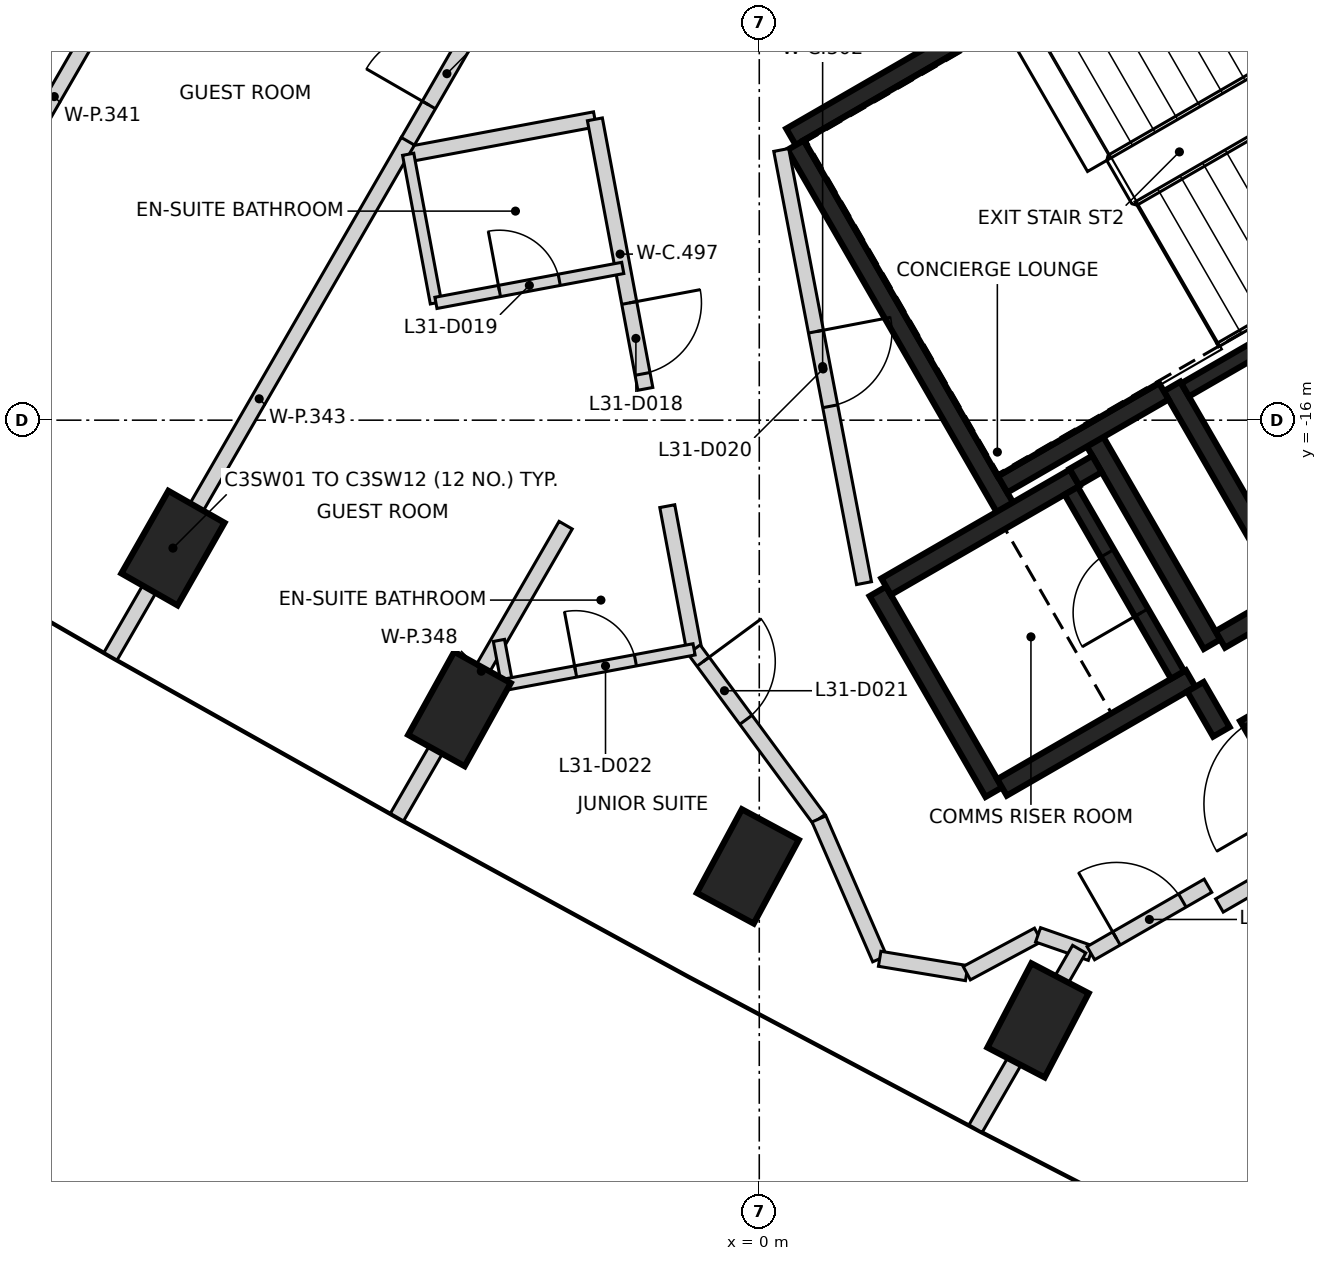
"""IFC4 building model, lengths in metres.
Left out: names, types, materials, properties, quantities, classifications, styles, units other than length and angle.
Written with IfcOpenShell. Run it as: python <this file> out.ifc"""

import sys

from ifc_helpers import new_model, si_unit, direction, frame, frame_2d, origin, origin_2d, place, context, subcontext, project, spatial, rectangle, extrude, element, fill, save


model = new_model("IFC4")
c1 = context("Model", 3, precision=1e-05, world=origin(), true_north=direction((0.0, 1.0)))
c2 = subcontext(c1, "Body", "Model", "MODEL_VIEW")
j1 = project(units=[si_unit("LENGTHUNIT", "METRE"), si_unit("PLANEANGLEUNIT", "RADIAN")], contexts=[c1])
p1 = place(None, origin())
s1 = spatial("IfcSite", under=j1, at=p1, CompositionType="ELEMENT")
p2 = place(p1, origin())
s2 = spatial("IfcBuilding", under=s1, at=p2, CompositionType="ELEMENT")
p3 = place(p2, frame((0.0, 0.0, 128.8)))
s3 = spatial("IfcBuildingStorey", under=s2, at=p3, CompositionType="ELEMENT", Elevation=128.8)
for number, where, z_axis, x_axis in (
    (1, (-7.714, -17.683, -0.4), (0.0, 0.0, 1.0), (0.495, 0.869, 0.0)),
    (2, (-3.945, -19.8, -0.4), (0.0, 0.0, 1.0), (0.485, 0.875, 0.0)),
    (3, (-0.151, -21.871, -0.4), (0.0, 0.0, 1.0), (0.474, 0.881, 0.0)),
    (4, (3.667, -23.896, -0.4), (0.0, 0.0, 1.0), (0.463, 0.886, 0.0)),
):
    element("IfcColumn", number, at=place(p3, frame(where, z_axis=z_axis, x_axis=x_axis)), inside=s3, PredefinedType="COLUMN", context=c2, shape_type="SweptSolid", body=[
        extrude(rectangle(XDim=1.25, YDim=0.85, at=origin_2d()), origin(), (0.0, 0.0, 1.0), 3.6),
    ])
p4 = place(p3, frame((0.417, -12.273, 0.0), z_axis=(0.0, 0.0, 1.0), x_axis=(0.866021906294, 0.500006057782, 0.0)))
e5 = element("IfcWall", 5, at=p4, inside=s3, PredefinedType="SHEAR", context=c2, shape_type="SweptSolid", body=[
    extrude(rectangle(XDim=11.55, YDim=0.25, at=frame_2d((5.775, 0.0))), origin(), (0.0, 0.0, 1.0), 3.2),
])
p5 = place(p4, frame((10.025, 0.0, 0.0)))
e6 = element("IfcOpeningElement", 6, at=p5, cuts=e5, PredefinedType="OPENING", context=c2, shape_type="SweptSolid", body=[
    extrude(rectangle(XDim=1.2, YDim=2.1, at=frame_2d((0.6, 1.05))), frame((0.0, 0.135, 0.0), z_axis=(0.0, -1.0, 0.0), x_axis=(1.0, 0.0, 0.0)), (0.0, 0.0, 1.0), 0.27),
])
p6 = place(p4, frame((8.725, 0.0, 0.0)))
e7 = element("IfcOpeningElement", 7, at=p6, cuts=e5, PredefinedType="OPENING", context=c2, shape_type="SweptSolid", body=[
    extrude(rectangle(XDim=1.2, YDim=2.1, at=frame_2d((0.6, 1.05))), frame((0.0, 0.135, 0.0), z_axis=(0.0, -1.0, 0.0), x_axis=(1.0, 0.0, 0.0)), (0.0, 0.0, 1.0), 0.27),
])
p7 = place(p3, frame((3.235, -17.153, 0.0), z_axis=(0.0, 0.0, 1.0), x_axis=(-0.500008851346, 0.866020293397, 0.0)))
e8 = element("IfcWall", 8, at=p7, inside=s3, PredefinedType="SHEAR", context=c2, shape_type="SweptSolid", body=[
    extrude(rectangle(XDim=5.51, YDim=0.25, at=frame_2d((2.755, 0.0))), origin(), (0.0, 0.0, 1.0), 3.2),
])
p8 = place(p3, frame((7.031, -18.327, 0.0), z_axis=(0.0, 0.0, 1.0), x_axis=(-0.499971222258, 0.866042017984, 0.0)))
e9 = element("IfcWall", 9, at=p8, inside=s3, PredefinedType="SHEAR", context=c2, shape_type="SweptSolid", body=[
    extrude(rectangle(XDim=3.2, YDim=0.25, at=frame_2d((1.6, 0.0))), origin(), (0.0, 0.0, 1.0), 3.2),
])
p9 = place(p3, frame((3.085, -20.894, 0.0), z_axis=(0.0, 0.0, 1.0), x_axis=(-0.499978833458, 0.866037623948, 0.0)))
e10 = element("IfcWall", 10, at=p9, inside=s3, PredefinedType="SHEAR", context=c2, shape_type="SweptSolid", body=[
    extrude(rectangle(XDim=3.05, YDim=0.25, at=frame_2d((1.525, 0.0))), origin(), (0.0, 0.0, 1.0), 3.2),
])
p10 = place(p3, frame((1.669, -18.19, 0.0), z_axis=(0.0, 0.0, 1.0), x_axis=(0.866042235819, 0.499970844928, 0.0)))
e11 = element("IfcWall", 11, at=p10, inside=s3, PredefinedType="SHEAR", context=c2, shape_type="SweptSolid", body=[
    extrude(rectangle(XDim=2.865, YDim=0.25, at=frame_2d((1.432, 0.0))), origin(), (0.0, 0.0, 1.0), 3.2),
])
p11 = place(p3, frame((5.675, -19.399, 0.0), z_axis=(0.0, 0.0, 1.0), x_axis=(-0.866026637627, -0.499997862916, 0.0)))
e12 = element("IfcWall", 12, at=p11, inside=s3, PredefinedType="SHEAR", context=c2, shape_type="SweptSolid", body=[
    extrude(rectangle(XDim=2.865, YDim=0.25, at=frame_2d((1.432, 0.0))), origin(), (0.0, 0.0, 1.0), 3.2),
])
p12 = place(p3, frame((4.414, -16.276, 0.0), z_axis=(0.0, 0.0, 1.0), x_axis=(0.500003324108, -0.866023484601, 0.0)))
e13 = element("IfcWall", 13, at=p12, inside=s3, PredefinedType="SHEAR", context=c2, shape_type="SweptSolid", body=[
    extrude(rectangle(XDim=3.085, YDim=0.25, at=frame_2d((1.542, 0.0))), origin(), (0.0, 0.0, 1.0), 3.2),
])
p13 = place(p3, frame((5.322, -15.619, 0.0), z_axis=(0.0, 0.0, 1.0), x_axis=(-0.866026229868, -0.499998569178, 0.0)))
e14 = element("IfcWall", 14, at=p13, inside=s3, PredefinedType="SHEAR", context=c2, shape_type="SweptSolid", body=[
    extrude(rectangle(XDim=2.449, YDim=0.25, at=frame_2d((1.225, 0.0))), origin(), (0.0, 0.0, 1.0), 3.2),
])
p14 = place(p3, frame((7.367, -21.51, 0.0), z_axis=(0.0, 0.0, 1.0), x_axis=(-0.499983108224, 0.866035156036, 0.0)))
e15 = element("IfcWall", 15, at=p14, inside=s3, PredefinedType="SHEAR", context=c2, shape_type="SweptSolid", body=[
    extrude(rectangle(XDim=1.865, YDim=0.25, at=frame_2d((0.932, 0.0))), origin(), (0.0, 0.0, 1.0), 3.2),
])
p15 = place(p14, frame((0.535, 0.0, 0.0)))
e16 = element("IfcOpeningElement", 16, at=p15, cuts=e15, PredefinedType="OPENING", context=c2, shape_type="SweptSolid", body=[
    extrude(rectangle(XDim=1.25, YDim=2.1, at=frame_2d((0.625, 1.05))), frame((0.0, 0.135, 0.0), z_axis=(0.0, -1.0, 0.0), x_axis=(1.0, 0.0, 0.0)), (0.0, 0.0, 1.0), 0.27),
])
p16 = place(p3, frame((6.065, -18.885, 0.0), z_axis=(0.0, 0.0, 1.0), x_axis=(0.866017078145, 0.500014420154, 0.0)))
e17 = element("IfcWall", 17, at=p16, inside=s3, PredefinedType="SHEAR", context=c2, shape_type="SweptSolid", body=[
    extrude(rectangle(XDim=0.989, YDim=0.25, at=frame_2d((0.495, 0.0))), origin(), (0.0, 0.0, 1.0), 3.2),
])
p17 = place(p3, frame((6.08, -20.1, 0.0), z_axis=(0.0, 0.0, 1.0), x_axis=(-0.500051773299, 0.865995510393, 0.0)))
e18 = element("IfcWall", 18, at=p17, inside=s3, PredefinedType="SHEAR", context=c2, shape_type="SweptSolid", body=[
    extrude(rectangle(XDim=0.685, YDim=0.25, at=frame_2d((0.342, 0.0))), origin(), (0.0, 0.0, 1.0), 3.2),
])
p18 = place(p3, frame((4.145, -16.749, 0.0), z_axis=(0.0, 0.0, 1.0), x_axis=(0.866185586049, 0.49972245349, 0.0)))
e19 = element("IfcWall", 19, at=p18, inside=s3, PredefinedType="SHEAR", context=c2, shape_type="SweptSolid", body=[
    extrude(rectangle(XDim=0.344, YDim=0.25, at=frame_2d((0.172, 0.0))), origin(), (0.0, 0.0, 1.0), 3.2),
])
p19 = place(p3, frame((10.538, -12.752, 0.0), z_axis=(0.0, 0.0, 1.0), x_axis=(-0.866038630372, -0.499977090179, 0.0)))
e20 = element("IfcWall", 20, at=p19, inside=s3, PredefinedType="SHEAR", context=c2, shape_type="SweptSolid", body=[
    extrude(rectangle(XDim=5.699, YDim=0.2, at=frame_2d((2.85, 0.0))), origin(), (0.0, 0.0, 1.0), 3.2),
])
p20 = place(p3, frame((5.503, -19.352, 0.0), z_axis=(0.0, 0.0, 1.0), x_axis=(-0.499986818241, 0.866033014143, 0.0)))
e21 = element("IfcWall", 21, at=p20, inside=s3, PredefinedType="SHEAR", context=c2, shape_type="SweptSolid", body=[
    extrude(rectangle(XDim=2.798, YDim=0.2, at=frame_2d((1.399, 0.0))), origin(), (0.0, 0.0, 1.0), 3.2),
])
p21 = place(p20, frame((0.949, 0.0, 0.0)))
e22 = element("IfcOpeningElement", 22, at=p21, cuts=e21, PredefinedType="OPENING", context=c2, shape_type="SweptSolid", body=[
    extrude(rectangle(XDim=0.9, YDim=2.1, at=frame_2d((0.45, 1.05))), frame((0.0, 0.11, 0.0), z_axis=(0.0, -1.0, 0.0), x_axis=(1.0, 0.0, 0.0)), (0.0, 0.0, 1.0), 0.22),
])
p22 = place(p3, frame((-4.629, -12.341, 0.0), z_axis=(0.0, 0.0, 1.0), x_axis=(0.500069467685, 0.865985292883, 0.0)))
e23 = element("IfcWall", 23, at=p22, inside=s3, PredefinedType="PARTITIONING", context=c2, shape_type="SweptSolid", body=[
    extrude(rectangle(XDim=4.202, YDim=0.2, at=frame_2d((2.101, 0.0))), origin(), (0.0, 0.0, 1.0), 3.2),
])
p23 = place(p22, frame((0.564, 0.0, 0.0)))
e24 = element("IfcOpeningElement", 24, at=p23, cuts=e23, PredefinedType="OPENING", context=c2, shape_type="SweptSolid", body=[
    extrude(rectangle(XDim=0.95, YDim=2.1, at=frame_2d((0.475, 1.05))), frame((0.0, 0.11, 0.0), z_axis=(0.0, -1.0, 0.0), x_axis=(1.0, 0.0, 0.0)), (0.0, 0.0, 1.0), 0.22),
])
p24 = place(p3, frame((-4.6, -12.498, 0.0), z_axis=(0.0, 0.0, 1.0), x_axis=(0.982950102255, 0.183872500602, 0.0)))
e25 = element("IfcWall", 25, at=p24, inside=s3, PredefinedType="PARTITIONING", context=c2, shape_type="SweptSolid", body=[
    extrude(rectangle(XDim=2.48, YDim=0.2, at=frame_2d((1.24, 0.0))), origin(), (0.0, 0.0, 1.0), 3.2),
])
p25 = place(p3, frame((-2.163, -12.042, 0.0), z_axis=(0.0, 0.0, 1.0), x_axis=(0.183945287989, -0.982936483719, 0.0)))
e26 = element("IfcWall", 26, at=p25, inside=s3, PredefinedType="PARTITIONING", context=c2, shape_type="SweptSolid", body=[
    extrude(rectangle(XDim=3.607, YDim=0.2, at=frame_2d((1.804, 0.0))), origin(), (0.0, 0.0, 1.0), 3.2),
])
p26 = place(p25, frame((2.458, 0.0, 0.0)))
e27 = element("IfcOpeningElement", 27, at=p26, cuts=e26, PredefinedType="OPENING", context=c2, shape_type="SweptSolid", body=[
    extrude(rectangle(XDim=0.95, YDim=2.1, at=frame_2d((0.475, 1.05))), frame((0.0, 0.11, 0.0), z_axis=(0.0, -1.0, 0.0), x_axis=(1.0, 0.0, 0.0)), (0.0, 0.0, 1.0), 0.22),
])
p27 = place(p3, frame((-1.21, -17.131, 0.0), z_axis=(0.0, 0.0, 1.0), x_axis=(0.183950101319, -0.982935582948, 0.0)))
e28 = element("IfcWall", 28, at=p27, inside=s3, PredefinedType="PARTITIONING", context=c2, shape_type="SweptSolid", body=[
    extrude(rectangle(XDim=1.917, YDim=0.2, at=frame_2d((0.958, 0.0))), origin(), (0.0, 0.0, 1.0), 3.2),
])
p28 = place(p3, frame((-0.858, -19.016, 0.0), z_axis=(0.0, 0.0, 1.0), x_axis=(0.593123867414, -0.805111220829, 0.0)))
e29 = element("IfcWall", 29, at=p28, inside=s3, PredefinedType="PARTITIONING", context=c2, shape_type="SweptSolid", body=[
    extrude(rectangle(XDim=2.77, YDim=0.2, at=frame_2d((1.385, 0.0))), origin(), (0.0, 0.0, 1.0), 3.2),
])
p29 = place(p28, frame((0.2, 0.0, 0.0)))
e30 = element("IfcOpeningElement", 30, at=p29, cuts=e29, PredefinedType="OPENING", context=c2, shape_type="SweptSolid", body=[
    extrude(rectangle(XDim=0.95, YDim=2.1, at=frame_2d((0.475, 1.05))), frame((0.0, 0.11, 0.0), z_axis=(0.0, -1.0, 0.0), x_axis=(1.0, 0.0, 0.0)), (0.0, 0.0, 1.0), 0.22),
])
p30 = place(p3, frame((0.289, -12.445, 0.0), z_axis=(0.0, 0.0, 1.0), x_axis=(0.187668946952, -0.982232338273, 0.0)))
e31 = element("IfcWall", 31, at=p30, inside=s3, PredefinedType="PARTITIONING", context=c2, shape_type="SweptSolid", body=[
    extrude(rectangle(XDim=5.802, YDim=0.2, at=frame_2d((2.901, 0.0))), origin(), (0.0, 0.0, 1.0), 3.2),
])
p31 = place(p30, frame((2.433, 0.0, 0.0)))
e32 = element("IfcOpeningElement", 32, at=p31, cuts=e31, PredefinedType="OPENING", context=c2, shape_type="SweptSolid", body=[
    extrude(rectangle(XDim=1.0, YDim=2.1, at=frame_2d((0.5, 1.05))), frame((0.0, 0.11, 0.0), z_axis=(0.0, -1.0, 0.0), x_axis=(1.0, 0.0, 0.0)), (0.0, 0.0, 1.0), 0.22),
])
p32 = place(p3, frame((0.785, -21.246, 0.0), z_axis=(0.0, 0.0, 1.0), x_axis=(0.398365586627, -0.917226721913, 0.0)))
e33 = element("IfcWall", 33, at=p32, inside=s3, PredefinedType="PARTITIONING", context=c2, shape_type="SweptSolid", body=[
    extrude(rectangle(XDim=2.006, YDim=0.2, at=frame_2d((1.003, 0.0))), origin(), (0.0, 0.0, 1.0), 2.3),
])
p33 = place(p3, frame((1.584, -23.086, 0.0), z_axis=(0.0, 0.0, 1.0), x_axis=(0.986654221629, -0.162829502674, 0.0)))
e34 = element("IfcWall", 34, at=p33, inside=s3, PredefinedType="PARTITIONING", context=c2, shape_type="SweptSolid", body=[
    extrude(rectangle(XDim=1.16, YDim=0.2, at=frame_2d((0.58, 0.0))), origin(), (0.0, 0.0, 1.0), 2.3),
])
p34 = place(p3, frame((2.73, -23.275, 0.0), z_axis=(0.0, 0.0, 1.0), x_axis=(0.880927165636, 0.473251866182, 0.0)))
e35 = element("IfcWall", 35, at=p34, inside=s3, PredefinedType="PARTITIONING", context=c2, shape_type="SweptSolid", body=[
    extrude(rectangle(XDim=1.065, YDim=0.2, at=frame_2d((0.532, 0.0))), origin(), (0.0, 0.0, 1.0), 3.2),
])
p35 = place(p3, frame((3.668, -22.771, 0.0), z_axis=(0.0, 0.0, 1.0), x_axis=(0.944447470761, -0.328662402738, 0.0)))
e36 = element("IfcWall", 36, at=p35, inside=s3, PredefinedType="PARTITIONING", context=c2, shape_type="SweptSolid", body=[
    extrude(rectangle(XDim=0.735, YDim=0.2, at=frame_2d((0.367, 0.0))), origin(), (0.0, 0.0, 1.0), 3.2),
])
p36 = place(p3, frame((4.362, -23.012, 0.0), z_axis=(0.0, 0.0, 1.0), x_axis=(0.866692617793, 0.49884256661, 0.0)))
e37 = element("IfcWall", 37, at=p36, inside=s3, PredefinedType="PARTITIONING", context=c2, shape_type="SweptSolid", body=[
    extrude(rectangle(XDim=1.778, YDim=0.2, at=frame_2d((0.889, 0.0))), origin(), (0.0, 0.0, 1.0), 3.2),
])
p37 = place(p36, frame((0.389, 0.0, 0.0)))
e38 = element("IfcOpeningElement", 38, at=p37, cuts=e37, PredefinedType="OPENING", context=c2, shape_type="SweptSolid", body=[
    extrude(rectangle(XDim=1.0, YDim=2.1, at=frame_2d((0.5, 1.05))), frame((0.0, 0.11, 0.0), z_axis=(0.0, -1.0, 0.0), x_axis=(1.0, 0.0, 0.0)), (0.0, 0.0, 1.0), 0.22),
])
p38 = place(p3, frame((6.054, -22.385, 0.0), z_axis=(0.0, 0.0, 1.0), x_axis=(0.86593101922, 0.500163443238, 0.0)))
e39 = element("IfcWall", 39, at=p38, inside=s3, PredefinedType="PARTITIONING", context=c2, shape_type="SweptSolid", body=[
    extrude(rectangle(XDim=1.39, YDim=0.2, at=frame_2d((0.695, 0.0))), origin(), (0.0, 0.0, 1.0), 3.2),
])
p39 = place(p3, frame((-12.278, -16.946, 0.0), z_axis=(0.0, 0.0, 1.0), x_axis=(0.499887212932, 0.866090511637, 0.0)))
e40 = element("IfcWall", 40, at=p39, inside=s3, PredefinedType="PARTITIONING", context=c2, shape_type="SweptSolid", body=[
    extrude(rectangle(XDim=12.015, YDim=0.2, at=frame_2d((6.007, 0.0))), origin(), (0.0, 0.0, 1.0), 3.2),
])
p40 = place(p3, frame((-8.535, -19.107, 0.0), z_axis=(0.0, 0.0, 1.0), x_axis=(0.500028565219, 0.866008911019, 0.0)))
e41 = element("IfcWall", 41, at=p40, inside=s3, PredefinedType="PARTITIONING", context=c2, shape_type="SweptSolid", body=[
    extrude(rectangle(XDim=7.824, YDim=0.2, at=frame_2d((3.912, 0.0))), origin(), (0.0, 0.0, 1.0), 3.2),
])
p41 = place(p3, frame((-4.767, -21.223, 0.0), z_axis=(0.0, 0.0, 1.0), x_axis=(0.500305100915, 0.865849182017, 0.0)))
e42 = element("IfcWall", 42, at=p41, inside=s3, PredefinedType="PARTITIONING", context=c2, shape_type="SweptSolid", body=[
    extrude(rectangle(XDim=4.437, YDim=0.2, at=frame_2d((2.218, 0.0))), origin(), (0.0, 0.0, 1.0), 3.2),
])
p42 = place(p3, frame((2.845, -25.321, 0.0), z_axis=(0.0, 0.0, 1.0), x_axis=(0.499942002849, 0.866058885866, 0.0)))
e43 = element("IfcWall", 43, at=p42, inside=s3, PredefinedType="PARTITIONING", context=c2, shape_type="SweptSolid", body=[
    extrude(rectangle(XDim=2.727, YDim=0.2, at=frame_2d((1.364, 0.0))), origin(), (0.0, 0.0, 1.0), 3.2),
])
p43 = place(p3, frame((-4.619, -12.502, 0.0), z_axis=(0.0, 0.0, 1.0), x_axis=(0.183517674038, -0.983016410502, 0.0)))
e44 = element("IfcWall", 44, at=p43, inside=s3, PredefinedType="PARTITIONING", context=c2, shape_type="SweptSolid", body=[
    extrude(rectangle(XDim=1.989, YDim=0.15, at=frame_2d((0.994, 0.0))), origin(), (0.0, 0.0, 1.0), 3.2),
])
p44 = place(p3, frame((-4.254, -14.457, 0.0), z_axis=(0.0, 0.0, 1.0), x_axis=(0.98293843799, 0.183934844773, 0.0)))
e45 = element("IfcWall", 45, at=p44, inside=s3, PredefinedType="PARTITIONING", context=c2, shape_type="SweptSolid", body=[
    extrude(rectangle(XDim=2.501, YDim=0.15, at=frame_2d((1.25, 0.0))), origin(), (0.0, 0.0, 1.0), 3.2),
])
p45 = place(p44, frame((0.85, 0.0, 0.0)))
e46 = element("IfcOpeningElement", 46, at=p45, cuts=e45, PredefinedType="OPENING", context=c2, shape_type="SweptSolid", body=[
    extrude(rectangle(XDim=0.8, YDim=2.1, at=frame_2d((0.4, 1.05))), frame((0.0, 0.085, 0.0), z_axis=(0.0, -1.0, 0.0), x_axis=(1.0, 0.0, 0.0)), (0.0, 0.0, 1.0), 0.17),
])
p46 = place(p3, frame((-3.425, -18.897, 0.0), z_axis=(0.0, 0.0, 1.0), x_axis=(0.183861553242, -0.982952150025, 0.0)))
e47 = element("IfcWall", 47, at=p46, inside=s3, PredefinedType="PARTITIONING", context=c2, shape_type="SweptSolid", body=[
    extrude(rectangle(XDim=0.587, YDim=0.15, at=frame_2d((0.293, 0.0))), origin(), (0.0, 0.0, 1.0), 3.2),
])
p47 = place(p3, frame((-3.315, -19.474, 0.0), z_axis=(0.0, 0.0, 1.0), x_axis=(0.982978173855, 0.183722371326, 0.0)))
e48 = element("IfcWall", 48, at=p47, inside=s3, PredefinedType="PARTITIONING", context=c2, shape_type="SweptSolid", body=[
    extrude(rectangle(XDim=2.5, YDim=0.15, at=frame_2d((1.25, 0.0))), origin(), (0.0, 0.0, 1.0), 3.2),
])
p48 = place(p47, frame((0.915, 0.0, 0.0)))
e49 = element("IfcOpeningElement", 49, at=p48, cuts=e48, PredefinedType="OPENING", context=c2, shape_type="SweptSolid", body=[
    extrude(rectangle(XDim=0.8, YDim=2.1, at=frame_2d((0.4, 1.05))), frame((0.0, 0.085, 0.0), z_axis=(0.0, -1.0, 0.0), x_axis=(1.0, 0.0, 0.0)), (0.0, 0.0, 1.0), 0.17),
])
p49 = place(p21, origin())
e50 = element("IfcDoor", 50, at=p49, inside=s3, OperationType="SINGLE_SWING_LEFT", PredefinedType="DOOR", context=c2, shape_type="SweptSolid", body=[
    extrude(rectangle(XDim=0.9, YDim=2.1, at=frame_2d((0.45, 1.05))), frame((0.0, 0.025, 0.0), z_axis=(0.0, -1.0, 0.0), x_axis=(1.0, 0.0, 0.0)), (0.0, 0.0, 1.0), 0.05),
])
fill(e22, e50)
p50 = place(p23, origin())
e51 = element("IfcDoor", 51, at=p50, inside=s3, OperationType="SINGLE_SWING_LEFT", PredefinedType="DOOR", context=c2, shape_type="SweptSolid", body=[
    extrude(rectangle(XDim=0.95, YDim=2.1, at=frame_2d((0.475, 1.05))), frame((0.0, 0.025, 0.0), z_axis=(0.0, -1.0, 0.0), x_axis=(1.0, 0.0, 0.0)), (0.0, 0.0, 1.0), 0.05),
])
fill(e24, e51)
p51 = place(p26, frame((0.95, 0.0, 0.0), z_axis=(0.0, 0.0, 1.0), x_axis=(-1.0, 0.0, 0.0)))
e52 = element("IfcDoor", 52, at=p51, inside=s3, OperationType="SINGLE_SWING_LEFT", PredefinedType="DOOR", context=c2, shape_type="SweptSolid", body=[
    extrude(rectangle(XDim=0.95, YDim=2.1, at=frame_2d((0.475, 1.05))), frame((0.0, 0.025, 0.0), z_axis=(0.0, -1.0, 0.0), x_axis=(1.0, 0.0, 0.0)), (0.0, 0.0, 1.0), 0.05),
])
fill(e27, e52)
p52 = place(p45, frame((0.8, 0.0, 0.0), z_axis=(0.0, 0.0, 1.0), x_axis=(-1.0, 0.0, 0.0)))
e53 = element("IfcDoor", 53, at=p52, inside=s3, OperationType="SINGLE_SWING_LEFT", PredefinedType="DOOR", context=c2, shape_type="SweptSolid", body=[
    extrude(rectangle(XDim=0.8, YDim=2.1, at=frame_2d((0.4, 1.05))), frame((0.0, 0.025, 0.0), z_axis=(0.0, -1.0, 0.0), x_axis=(1.0, 0.0, 0.0)), (0.0, 0.0, 1.0), 0.05),
])
fill(e46, e53)
p53 = place(p31, origin())
e54 = element("IfcDoor", 54, at=p53, inside=s3, OperationType="SINGLE_SWING_LEFT", PredefinedType="DOOR", context=c2, shape_type="SweptSolid", body=[
    extrude(rectangle(XDim=1.0, YDim=2.1, at=frame_2d((0.5, 1.05))), frame((0.0, 0.025, 0.0), z_axis=(0.0, -1.0, 0.0), x_axis=(1.0, 0.0, 0.0)), (0.0, 0.0, 1.0), 0.05),
])
fill(e32, e54)
p54 = place(p29, frame((0.95, 0.0, 0.0), z_axis=(0.0, 0.0, 1.0), x_axis=(-1.0, 0.0, 0.0)))
e55 = element("IfcDoor", 55, at=p54, inside=s3, OperationType="SINGLE_SWING_LEFT", PredefinedType="DOOR", context=c2, shape_type="SweptSolid", body=[
    extrude(rectangle(XDim=0.95, YDim=2.1, at=frame_2d((0.475, 1.05))), frame((0.0, 0.025, 0.0), z_axis=(0.0, -1.0, 0.0), x_axis=(1.0, 0.0, 0.0)), (0.0, 0.0, 1.0), 0.05),
])
fill(e30, e55)
p55 = place(p48, frame((0.8, 0.0, 0.0), z_axis=(0.0, 0.0, 1.0), x_axis=(-1.0, 0.0, 0.0)))
e56 = element("IfcDoor", 56, at=p55, inside=s3, OperationType="SINGLE_SWING_LEFT", PredefinedType="DOOR", context=c2, shape_type="SweptSolid", body=[
    extrude(rectangle(XDim=0.8, YDim=2.1, at=frame_2d((0.4, 1.05))), frame((0.0, 0.025, 0.0), z_axis=(0.0, -1.0, 0.0), x_axis=(1.0, 0.0, 0.0)), (0.0, 0.0, 1.0), 0.05),
])
fill(e49, e56)
p56 = place(p37, frame((1.0, 0.0, 0.0), z_axis=(0.0, 0.0, 1.0), x_axis=(-1.0, 0.0, 0.0)))
e57 = element("IfcDoor", 57, at=p56, inside=s3, OperationType="SINGLE_SWING_LEFT", PredefinedType="DOOR", context=c2, shape_type="SweptSolid", body=[
    extrude(rectangle(XDim=1.0, YDim=2.1, at=frame_2d((0.5, 1.05))), frame((0.0, 0.025, 0.0), z_axis=(0.0, -1.0, 0.0), x_axis=(1.0, 0.0, 0.0)), (0.0, 0.0, 1.0), 0.05),
])
fill(e38, e57)
save(model, sys.argv[1])
